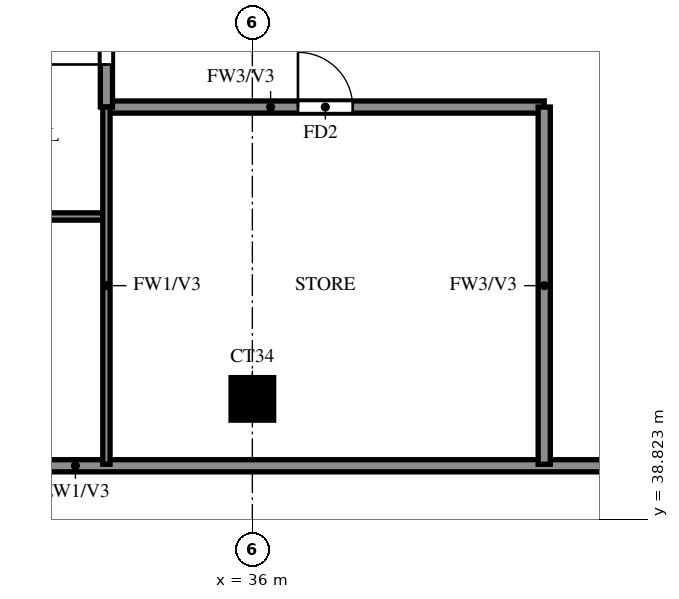
"""IFC4 building model, lengths in metres.
Left out: names, types, materials, properties, quantities, classifications, styles, units other than length and angle.
Written with IfcOpenShell. Run it as: python <this file> out.ifc"""

import sys

from ifc_helpers import new_model, si_unit, direction, frame, frame_2d, origin, origin_2d, place, context, subcontext, project, spatial, rectangle, extrude, source, transform, mapped, element, fill, save


model = new_model("IFC4")
c1 = context("Model", 3, precision=1e-05, world=origin(), true_north=direction((0.0, 1.0)))
c2 = subcontext(c1, "Body", "Model", "MODEL_VIEW")
j1 = project(units=[si_unit("LENGTHUNIT", "METRE"), si_unit("PLANEANGLEUNIT", "RADIAN")], contexts=[c1])
p1 = place(None, origin())
s1 = spatial("IfcSite", under=j1, at=p1, CompositionType="ELEMENT")
p2 = place(p1, origin())
s2 = spatial("IfcBuilding", under=s1, at=p2, CompositionType="ELEMENT")
p3 = place(p2, frame((0.0, 0.0, 264.0)))
s3 = spatial("IfcBuildingStorey", under=s2, at=p3, CompositionType="ELEMENT", Elevation=264.0)
m1 = source(origin(), c2, "Body", "SweptSolid", [
    extrude(rectangle(XDim=0.7, YDim=0.7, at=origin_2d()), origin(), (0.0, 0.0, 1.0), 3.22),
])
p4 = place(p3, frame((36.0, 40.8, 0.0), z_axis=(0.0, 0.0, 1.0), x_axis=(1.0, 0.0, 0.0)))
e1 = element("IfcColumn", 1, at=p4, inside=s3, PredefinedType="COLUMN", context=c2, shape_type="MappedRepresentation", body=[
    mapped(m1, transform((0.0, 0.0, 0.0))),
])
p5 = place(p3, frame((22.2, 39.7, 0.0), z_axis=(0.0, 0.0, 1.0), x_axis=(1.0, 0.0, 0.0)))
e2 = element("IfcWall", 2, at=p5, inside=s3, PredefinedType="SOLIDWALL", context=c2, shape_type="SweptSolid", body=[
    extrude(rectangle(XDim=19.8, YDim=0.2, at=frame_2d((9.9, 0.0))), origin(), (0.0, 0.0, 1.0), 3.22),
])
p6 = place(p5, frame((0.7, 0.0, 0.6)))
e3 = element("IfcOpeningElement", 3, at=p6, cuts=e2, PredefinedType="OPENING", context=c2, shape_type="SweptSolid", body=[
    extrude(rectangle(XDim=1.8, YDim=2.4, at=frame_2d((0.9, 1.2))), frame((0.0, 0.11, 0.0), z_axis=(0.0, -1.0, 0.0), x_axis=(1.0, 0.0, 0.0)), (0.0, 0.0, 1.0), 0.22),
])
p7 = place(p5, frame((4.35, 0.0, 1.5)))
e4 = element("IfcOpeningElement", 4, at=p7, cuts=e2, PredefinedType="OPENING", context=c2, shape_type="SweptSolid", body=[
    extrude(rectangle(XDim=0.9, YDim=0.9, at=frame_2d((0.45, 0.45))), frame((0.0, 0.11, 0.0), z_axis=(0.0, -1.0, 0.0), x_axis=(1.0, 0.0, 0.0)), (0.0, 0.0, 1.0), 0.22),
])
p8 = place(p5, frame((7.8, 0.0, 0.6)))
e5 = element("IfcOpeningElement", 5, at=p8, cuts=e2, PredefinedType="OPENING", context=c2, shape_type="SweptSolid", body=[
    extrude(rectangle(XDim=2.4, YDim=2.4, at=frame_2d((1.2, 1.2))), frame((0.0, 0.11, 0.0), z_axis=(0.0, -1.0, 0.0), x_axis=(1.0, 0.0, 0.0)), (0.0, 0.0, 1.0), 0.22),
])
p9 = place(p3, frame((33.6, 45.6, 0.0), z_axis=(0.0, 0.0, 1.0), x_axis=(1.0, 0.0, 0.0)))
e6 = element("IfcWall", 6, at=p9, inside=s3, PredefinedType="SOLIDWALL", context=c2, shape_type="SweptSolid", body=[
    extrude(rectangle(XDim=7.2, YDim=0.2, at=frame_2d((3.6, 0.0))), origin(), (0.0, 0.0, 1.0), 3.22),
])
p10 = place(p9, frame((3.15, 0.0, 0.0)))
e7 = element("IfcOpeningElement", 7, at=p10, cuts=e6, PredefinedType="OPENING", context=c2, shape_type="SweptSolid", body=[
    extrude(rectangle(XDim=0.9, YDim=2.1, at=frame_2d((0.45, 1.05))), frame((0.0, 0.11, 0.0), z_axis=(0.0, -1.0, 0.0), x_axis=(1.0, 0.0, 0.0)), (0.0, 0.0, 1.0), 0.22),
])
p11 = place(p3, frame((33.6, 45.6, 0.0), z_axis=(0.0, 0.0, 1.0), x_axis=(0.0, 1.0, 0.0)))
e8 = element("IfcWall", 8, at=p11, inside=s3, PredefinedType="SOLIDWALL", context=c2, shape_type="SweptSolid", body=[
    extrude(rectangle(XDim=16.8, YDim=0.2, at=frame_2d((8.4, 0.0))), origin(), (0.0, 0.0, 1.0), 3.22),
])
p12 = place(p11, frame((0.7, 0.0, 0.0)))
e9 = element("IfcOpeningElement", 9, at=p12, cuts=e8, PredefinedType="OPENING", context=c2, shape_type="SweptSolid", body=[
    extrude(rectangle(XDim=1.0, YDim=2.1, at=frame_2d((0.5, 1.05))), frame((0.0, 0.11, 0.0), z_axis=(0.0, -1.0, 0.0), x_axis=(1.0, 0.0, 0.0)), (0.0, 0.0, 1.0), 0.22),
])
p13 = place(p11, frame((8.3, 0.0, 0.0)))
e10 = element("IfcOpeningElement", 10, at=p13, cuts=e8, PredefinedType="OPENING", context=c2, shape_type="SweptSolid", body=[
    extrude(rectangle(XDim=1.0, YDim=2.1, at=frame_2d((0.5, 1.05))), frame((0.0, 0.11, 0.0), z_axis=(0.0, -1.0, 0.0), x_axis=(1.0, 0.0, 0.0)), (0.0, 0.0, 1.0), 0.22),
])
p14 = place(p11, frame((15.1, 0.0, 0.0)))
e11 = element("IfcOpeningElement", 11, at=p14, cuts=e8, PredefinedType="OPENING", context=c2, shape_type="SweptSolid", body=[
    extrude(rectangle(XDim=1.0, YDim=2.1, at=frame_2d((0.5, 1.05))), frame((0.0, 0.11, 0.0), z_axis=(0.0, -1.0, 0.0), x_axis=(1.0, 0.0, 0.0)), (0.0, 0.0, 1.0), 0.22),
])
p15 = place(p3, frame((40.8, 39.725, 0.0), z_axis=(0.0, 0.0, 1.0), x_axis=(0.0, 1.0, 0.0)))
e12 = element("IfcWall", 12, at=p15, inside=s3, PredefinedType="SOLIDWALL", context=c2, shape_type="SweptSolid", body=[
    extrude(rectangle(XDim=5.875, YDim=0.2, at=frame_2d((2.938, 0.0))), origin(), (0.0, 0.0, 1.0), 3.22),
])
p16 = place(p3, frame((25.2, 43.8, 0.0), z_axis=(0.0, 0.0, 1.0), x_axis=(1.0, 0.0, 0.0)))
e13 = element("IfcWall", 13, at=p16, inside=s3, PredefinedType="PARTITIONING", context=c2, shape_type="SweptSolid", body=[
    extrude(rectangle(XDim=8.4, YDim=0.12, at=frame_2d((4.2, 0.0))), origin(), (0.0, 0.0, 1.0), 3.22),
])
p17 = place(p16, frame((1.35, 0.0, 0.0)))
e14 = element("IfcOpeningElement", 14, at=p17, cuts=e13, PredefinedType="OPENING", context=c2, shape_type="SweptSolid", body=[
    extrude(rectangle(XDim=0.9, YDim=2.1, at=frame_2d((0.45, 1.05))), frame((0.0, 0.07, 0.0), z_axis=(0.0, -1.0, 0.0), x_axis=(1.0, 0.0, 0.0)), (0.0, 0.0, 1.0), 0.14),
])
p18 = place(p16, frame((5.55, 0.0, 0.0)))
e15 = element("IfcOpeningElement", 15, at=p18, cuts=e13, PredefinedType="OPENING", context=c2, shape_type="SweptSolid", body=[
    extrude(rectangle(XDim=0.9, YDim=2.1, at=frame_2d((0.45, 1.05))), frame((0.0, 0.07, 0.0), z_axis=(0.0, -1.0, 0.0), x_axis=(1.0, 0.0, 0.0)), (0.0, 0.0, 1.0), 0.14),
])
p19 = place(p3, frame((33.6, 39.725, 0.0), z_axis=(0.0, 0.0, 1.0), x_axis=(0.0, 1.0, 0.0)))
e16 = element("IfcWall", 16, at=p19, inside=s3, PredefinedType="PARTITIONING", context=c2, shape_type="SweptSolid", body=[
    extrude(rectangle(XDim=5.875, YDim=0.12, at=frame_2d((2.938, 0.0))), origin(), (0.0, 0.0, 1.0), 3.22),
])
p20 = place(p12, origin())
e17 = element("IfcDoor", 17, at=p20, inside=s3, OperationType="SINGLE_SWING_LEFT", PredefinedType="DOOR", context=c2, shape_type="SweptSolid", body=[
    extrude(rectangle(XDim=1.0, YDim=2.1, at=frame_2d((0.5, 1.05))), frame((0.0, 0.025, 0.0), z_axis=(0.0, -1.0, 0.0), x_axis=(1.0, 0.0, 0.0)), (0.0, 0.0, 1.0), 0.05),
])
fill(e9, e17)
p21 = place(p10, origin())
e18 = element("IfcDoor", 18, at=p21, inside=s3, OperationType="SINGLE_SWING_LEFT", PredefinedType="DOOR", context=c2, shape_type="SweptSolid", body=[
    extrude(rectangle(XDim=0.9, YDim=2.1, at=frame_2d((0.45, 1.05))), frame((0.0, 0.025, 0.0), z_axis=(0.0, -1.0, 0.0), x_axis=(1.0, 0.0, 0.0)), (0.0, 0.0, 1.0), 0.05),
])
fill(e7, e18)
save(model, sys.argv[1])
